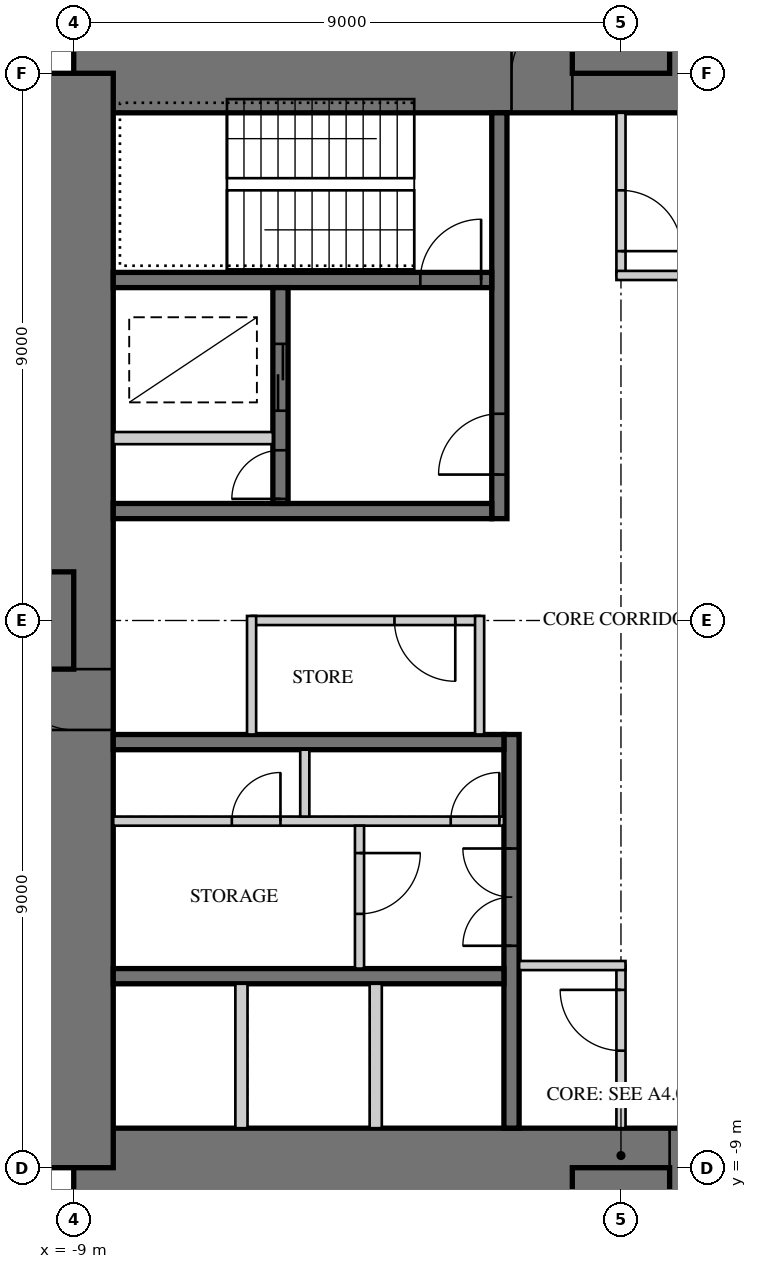
"""IFC4 building model, lengths in metres.
Left out: names, types, materials, properties, quantities, classifications, styles, units other than length and angle.
Written with IfcOpenShell. Run it as: python <this file> out.ifc"""

import sys

from ifc_helpers import new_model, si_unit, direction, frame, frame_2d, origin, place, context, subcontext, project, spatial, rectangle, extrude, element, fill, save


model = new_model("IFC4")
c1 = context("Model", 3, precision=1e-05, world=origin(), true_north=direction((0.0, 1.0)))
c2 = subcontext(c1, "Body", "Model", "MODEL_VIEW")
j1 = project(units=[si_unit("LENGTHUNIT", "METRE"), si_unit("PLANEANGLEUNIT", "RADIAN")], contexts=[c1])
p1 = place(None, origin())
s1 = spatial("IfcSite", under=j1, at=p1, CompositionType="ELEMENT")
p2 = place(p1, origin())
s2 = spatial("IfcBuilding", under=s1, at=p2, CompositionType="ELEMENT")
p3 = place(p2, frame((0.0, 0.0, 27.5)))
s3 = spatial("IfcBuildingStorey", under=s2, at=p3, CompositionType="ELEMENT", Elevation=27.5)
p4 = place(p3, frame((9.0, 9.0, 0.0), z_axis=(0.0, 0.0, 1.0), x_axis=(-1.0, 0.0, 0.0)))
e1 = element("IfcWall", 1, at=p4, inside=s3, PredefinedType="SHEAR", context=c2, shape_type="SweptSolid", body=[
    extrude(rectangle(XDim=18.0, YDim=1.3, at=frame_2d((9.0, 0.0))), origin(), (0.0, 0.0, 1.0), 4.0),
])
p5 = place(p4, frame((9.8, 0.0, 0.0)))
e2 = element("IfcOpeningElement", 2, at=p5, cuts=e1, PredefinedType="OPENING", context=c2, shape_type="SweptSolid", body=[
    extrude(rectangle(XDim=1.0, YDim=2.4, at=frame_2d((0.5, 1.2))), frame((0.0, 0.66, 0.0), z_axis=(0.0, -1.0, 0.0), x_axis=(1.0, 0.0, 0.0)), (0.0, 0.0, 1.0), 1.32),
])
p6 = place(p3, frame((-9.0, -9.0, 0.0), z_axis=(0.0, 0.0, 1.0), x_axis=(1.0, 0.0, 0.0)))
e3 = element("IfcWall", 3, at=p6, inside=s3, PredefinedType="SHEAR", context=c2, shape_type="SweptSolid", body=[
    extrude(rectangle(XDim=18.0, YDim=1.3, at=frame_2d((9.0, 0.0))), origin(), (0.0, 0.0, 1.0), 4.0),
])
p7 = place(p6, frame((9.8, 0.0, 0.0)))
e4 = element("IfcOpeningElement", 4, at=p7, cuts=e3, PredefinedType="OPENING", context=c2, shape_type="SweptSolid", body=[
    extrude(rectangle(XDim=1.0, YDim=2.4, at=frame_2d((0.5, 1.2))), frame((0.0, 0.66, 0.0), z_axis=(0.0, -1.0, 0.0), x_axis=(1.0, 0.0, 0.0)), (0.0, 0.0, 1.0), 1.32),
])
p8 = place(p3, frame((-9.0, 9.0, 0.0), z_axis=(0.0, 0.0, 1.0), x_axis=(0.0, -1.0, 0.0)))
e5 = element("IfcWall", 5, at=p8, inside=s3, PredefinedType="SHEAR", context=c2, shape_type="SweptSolid", body=[
    extrude(rectangle(XDim=18.0, YDim=1.3, at=frame_2d((9.0, 0.0))), origin(), (0.0, 0.0, 1.0), 4.0),
])
p9 = place(p8, frame((9.8, 0.0, 0.0)))
e6 = element("IfcOpeningElement", 6, at=p9, cuts=e5, PredefinedType="OPENING", context=c2, shape_type="SweptSolid", body=[
    extrude(rectangle(XDim=1.0, YDim=2.4, at=frame_2d((0.5, 1.2))), frame((0.0, 0.66, 0.0), z_axis=(0.0, -1.0, 0.0), x_axis=(1.0, 0.0, 0.0)), (0.0, 0.0, 1.0), 1.32),
])
p10 = place(p3, frame((-2.0, 1.675, 0.0), z_axis=(0.0, 0.0, 1.0), x_axis=(0.0, 1.0, 0.0)))
e7 = element("IfcWall", 7, at=p10, inside=s3, PredefinedType="SHEAR", context=c2, shape_type="SweptSolid", body=[
    extrude(rectangle(XDim=6.675, YDim=0.25, at=frame_2d((3.337, 0.0))), origin(), (0.0, 0.0, 1.0), 4.0),
])
p11 = place(p10, frame((0.725, 0.0, 0.0)))
e8 = element("IfcOpeningElement", 8, at=p11, cuts=e7, PredefinedType="OPENING", context=c2, shape_type="SweptSolid", body=[
    extrude(rectangle(XDim=1.0, YDim=2.1, at=frame_2d((0.5, 1.05))), frame((0.0, 0.135, 0.0), z_axis=(0.0, -1.0, 0.0), x_axis=(1.0, 0.0, 0.0)), (0.0, 0.0, 1.0), 0.27),
])
p12 = place(p3, frame((-2.125, 1.8, 0.0), z_axis=(0.0, 0.0, 1.0), x_axis=(-1.0, 0.0, 0.0)))
e9 = element("IfcWall", 9, at=p12, inside=s3, PredefinedType="SHEAR", context=c2, shape_type="SweptSolid", body=[
    extrude(rectangle(XDim=6.225, YDim=0.25, at=frame_2d((3.113, 0.0))), origin(), (0.0, 0.0, 1.0), 4.0),
])
p13 = place(p3, frame((-2.125, 5.6, 0.0), z_axis=(0.0, 0.0, 1.0), x_axis=(-1.0, 0.0, 0.0)))
e10 = element("IfcWall", 10, at=p13, inside=s3, PredefinedType="SHEAR", context=c2, shape_type="SweptSolid", body=[
    extrude(rectangle(XDim=6.225, YDim=0.25, at=frame_2d((3.113, 0.0))), origin(), (0.0, 0.0, 1.0), 4.0),
])
p14 = place(p13, frame((0.175, 0.0, 0.0)))
e11 = element("IfcOpeningElement", 11, at=p14, cuts=e10, PredefinedType="OPENING", context=c2, shape_type="SweptSolid", body=[
    extrude(rectangle(XDim=1.0, YDim=2.1, at=frame_2d((0.5, 1.05))), frame((0.0, 0.135, 0.0), z_axis=(0.0, -1.0, 0.0), x_axis=(1.0, 0.0, 0.0)), (0.0, 0.0, 1.0), 0.27),
])
p15 = place(p3, frame((-5.6, 1.925, 0.0), z_axis=(0.0, 0.0, 1.0), x_axis=(0.0, 1.0, 0.0)))
e12 = element("IfcWall", 12, at=p15, inside=s3, PredefinedType="SHEAR", context=c2, shape_type="SweptSolid", body=[
    extrude(rectangle(XDim=3.55, YDim=0.25, at=frame_2d((1.775, 0.0))), origin(), (0.0, 0.0, 1.0), 4.0),
])
p16 = place(p15, frame((1.525, 0.0, 0.0)))
e13 = element("IfcOpeningElement", 13, at=p16, cuts=e12, PredefinedType="OPENING", context=c2, shape_type="SweptSolid", body=[
    extrude(rectangle(XDim=1.1, YDim=2.2, at=frame_2d((0.55, 1.1))), frame((0.0, 0.135, 0.0), z_axis=(0.0, -1.0, 0.0), x_axis=(1.0, 0.0, 0.0)), (0.0, 0.0, 1.0), 0.27),
])
p17 = place(p15, frame((0.075, 0.0, 0.0)))
e14 = element("IfcOpeningElement", 14, at=p17, cuts=e12, PredefinedType="OPENING", context=c2, shape_type="SweptSolid", body=[
    extrude(rectangle(XDim=0.8, YDim=2.1, at=frame_2d((0.4, 1.05))), frame((0.0, 0.135, 0.0), z_axis=(0.0, -1.0, 0.0), x_axis=(1.0, 0.0, 0.0)), (0.0, 0.0, 1.0), 0.27),
])
p18 = place(p3, frame((-5.725, 3.0, 0.0), z_axis=(0.0, 0.0, 1.0), x_axis=(-1.0, 0.0, 0.0)))
e15 = element("IfcWall", 15, at=p18, inside=s3, PredefinedType="PARTITIONING", context=c2, shape_type="SweptSolid", body=[
    extrude(rectangle(XDim=2.625, YDim=0.2, at=frame_2d((1.312, 0.0))), origin(), (0.0, 0.0, 1.0), 4.0),
])
p19 = place(p3, frame((-1.8, -1.875, 0.0), z_axis=(0.0, 0.0, 1.0), x_axis=(0.0, -1.0, 0.0)))
e16 = element("IfcWall", 16, at=p19, inside=s3, PredefinedType="SHEAR", context=c2, shape_type="SweptSolid", body=[
    extrude(rectangle(XDim=6.475, YDim=0.25, at=frame_2d((3.238, 0.0))), origin(), (0.0, 0.0, 1.0), 4.0),
])
p20 = place(p19, frame((1.875, 0.0, 0.0)))
e17 = element("IfcOpeningElement", 17, at=p20, cuts=e16, PredefinedType="OPENING", context=c2, shape_type="SweptSolid", body=[
    extrude(rectangle(XDim=1.6, YDim=2.4, at=frame_2d((0.8, 1.2))), frame((0.0, 0.135, 0.0), z_axis=(0.0, -1.0, 0.0), x_axis=(1.0, 0.0, 0.0)), (0.0, 0.0, 1.0), 0.27),
])
for number, where, z_axis, x_axis in (
    (18, (-1.925, -2.0, 0.0), (0.0, 0.0, 1.0), (-1.0, 0.0, 0.0)),
    (19, (-1.925, -5.85, 0.0), (0.0, 0.0, 1.0), (-1.0, 0.0, 0.0)),
):
    element("IfcWall", number, at=place(p3, frame(where, z_axis=z_axis, x_axis=x_axis)), inside=s3, PredefinedType="SHEAR", context=c2, shape_type="SweptSolid", body=[
        extrude(rectangle(XDim=6.425, YDim=0.25, at=frame_2d((3.212, 0.0))), origin(), (0.0, 0.0, 1.0), 4.0),
    ])
p21 = place(p3, frame((-1.925, -3.3, 0.0), z_axis=(0.0, 0.0, 1.0), x_axis=(-1.0, 0.0, 0.0)))
e20 = element("IfcWall", 20, at=p21, inside=s3, PredefinedType="PARTITIONING", context=c2, shape_type="SweptSolid", body=[
    extrude(rectangle(XDim=6.425, YDim=0.15, at=frame_2d((3.212, 0.0))), origin(), (0.0, 0.0, 1.0), 4.0),
])
p22 = place(p21, frame((0.075, 0.0, 0.0)))
e21 = element("IfcOpeningElement", 21, at=p22, cuts=e20, PredefinedType="OPENING", context=c2, shape_type="SweptSolid", body=[
    extrude(rectangle(XDim=0.8, YDim=2.1, at=frame_2d((0.4, 1.05))), frame((0.0, 0.085, 0.0), z_axis=(0.0, -1.0, 0.0), x_axis=(1.0, 0.0, 0.0)), (0.0, 0.0, 1.0), 0.17),
])
p23 = place(p21, frame((3.675, 0.0, 0.0)))
e22 = element("IfcOpeningElement", 22, at=p23, cuts=e20, PredefinedType="OPENING", context=c2, shape_type="SweptSolid", body=[
    extrude(rectangle(XDim=0.8, YDim=2.1, at=frame_2d((0.4, 1.05))), frame((0.0, 0.085, 0.0), z_axis=(0.0, -1.0, 0.0), x_axis=(1.0, 0.0, 0.0)), (0.0, 0.0, 1.0), 0.17),
])
p24 = place(p3, frame((-5.2, -2.125, 0.0), z_axis=(0.0, 0.0, 1.0), x_axis=(0.0, -1.0, 0.0)))
e23 = element("IfcWall", 23, at=p24, inside=s3, PredefinedType="PARTITIONING", context=c2, shape_type="SweptSolid", body=[
    extrude(rectangle(XDim=1.1, YDim=0.15, at=frame_2d((0.55, 0.0))), origin(), (0.0, 0.0, 1.0), 4.0),
])
for number, where, z_axis, x_axis in (
    (24, (-4.033, -5.975, 0.0), (0.0, 0.0, 1.0), (0.0, -1.0, 0.0)),
    (25, (-6.242, -5.975, 0.0), (0.0, 0.0, 1.0), (0.0, -1.0, 0.0)),
):
    element("IfcWall", number, at=place(p3, frame(where, z_axis=z_axis, x_axis=x_axis)), inside=s3, PredefinedType="PARTITIONING", context=c2, shape_type="SweptSolid", body=[
        extrude(rectangle(XDim=2.375, YDim=0.2, at=frame_2d((1.188, 0.0))), origin(), (0.0, 0.0, 1.0), 4.0),
    ])
p25 = place(p3, frame((0.0, 9.0, 0.0), z_axis=(0.0, 0.0, 1.0), x_axis=(0.0, 1.0, 0.0)))
e26 = element("IfcWall", 26, at=p25, inside=s3, PredefinedType="SHEAR", context=c2, shape_type="SweptSolid", body=[
    extrude(rectangle(XDim=9.0, YDim=1.6, at=frame_2d((4.5, 0.0))), origin(), (0.0, 0.0, 1.0), 4.0),
])
p26 = place(p3, frame((0.0, -9.0, 0.0), z_axis=(0.0, 0.0, 1.0), x_axis=(0.0, -1.0, 0.0)))
e27 = element("IfcWall", 27, at=p26, inside=s3, PredefinedType="SHEAR", context=c2, shape_type="SweptSolid", body=[
    extrude(rectangle(XDim=18.0, YDim=1.6, at=frame_2d((9.0, 0.0))), origin(), (0.0, 0.0, 1.0), 4.0),
])
p27 = place(p26, frame((9.9, 0.0, 0.0)))
e28 = element("IfcOpeningElement", 28, at=p27, cuts=e27, PredefinedType="OPENING", context=c2, shape_type="SweptSolid", body=[
    extrude(rectangle(XDim=1.0, YDim=2.2, at=frame_2d((0.5, 1.1))), frame((0.0, 0.81, 0.0), z_axis=(0.0, -1.0, 0.0), x_axis=(1.0, 0.0, 0.0)), (0.0, 0.0, 1.0), 1.62),
])
p28 = place(p3, frame((-9.0, 0.0, 0.0), z_axis=(0.0, 0.0, 1.0), x_axis=(-1.0, 0.0, 0.0)))
e29 = element("IfcWall", 29, at=p28, inside=s3, PredefinedType="SHEAR", context=c2, shape_type="SweptSolid", body=[
    extrude(rectangle(XDim=18.0, YDim=1.6, at=frame_2d((9.0, 0.0))), origin(), (0.0, 0.0, 1.0), 4.0),
])
p29 = place(p28, frame((9.9, 0.0, 0.0)))
e30 = element("IfcOpeningElement", 30, at=p29, cuts=e29, PredefinedType="OPENING", context=c2, shape_type="SweptSolid", body=[
    extrude(rectangle(XDim=1.0, YDim=2.2, at=frame_2d((0.5, 1.1))), frame((0.0, 0.81, 0.0), z_axis=(0.0, -1.0, 0.0), x_axis=(1.0, 0.0, 0.0)), (0.0, 0.0, 1.0), 1.62),
])
p30 = place(p3, frame((-2.325, 0.0, 0.0), z_axis=(0.0, 0.0, 1.0), x_axis=(-1.0, 0.0, 0.0)))
e31 = element("IfcWall", 31, at=p30, inside=s3, PredefinedType="PARTITIONING", context=c2, shape_type="SweptSolid", body=[
    extrude(rectangle(XDim=3.75, YDim=0.15, at=frame_2d((1.875, 0.0))), origin(), (0.0, 0.0, 1.0), 3.8),
])
p31 = place(p30, frame((0.4, 0.0, 0.0)))
e32 = element("IfcOpeningElement", 32, at=p31, cuts=e31, PredefinedType="OPENING", context=c2, shape_type="SweptSolid", body=[
    extrude(rectangle(XDim=1.0, YDim=2.1, at=frame_2d((0.5, 1.05))), frame((0.0, 0.085, 0.0), z_axis=(0.0, -1.0, 0.0), x_axis=(1.0, 0.0, 0.0)), (0.0, 0.0, 1.0), 0.17),
])
for number, where, z_axis, x_axis in (
    (33, (-2.325, -1.875, 0.0), (0.0, 0.0, 1.0), (0.0, 1.0, 0.0)),
    (34, (-6.075, 0.075, 0.0), (0.0, 0.0, 1.0), (0.0, -1.0, 0.0)),
):
    element("IfcWall", number, at=place(p3, frame(where, z_axis=z_axis, x_axis=x_axis)), inside=s3, PredefinedType="PARTITIONING", context=c2, shape_type="SweptSolid", body=[
        extrude(rectangle(XDim=1.95, YDim=0.15, at=frame_2d((0.975, 0.0))), origin(), (0.0, 0.0, 1.0), 3.8),
    ])
p32 = place(p3, frame((0.0, 5.675, 0.0), z_axis=(0.0, 0.0, 1.0), x_axis=(0.0, 1.0, 0.0)))
e35 = element("IfcWall", 35, at=p32, inside=s3, PredefinedType="PARTITIONING", context=c2, shape_type="SweptSolid", body=[
    extrude(rectangle(XDim=2.675, YDim=0.15, at=frame_2d((1.337, 0.0))), origin(), (0.0, 0.0, 1.0), 3.8),
])
p33 = place(p32, frame((0.4, 0.0, 0.0)))
e36 = element("IfcOpeningElement", 36, at=p33, cuts=e35, PredefinedType="OPENING", context=c2, shape_type="SweptSolid", body=[
    extrude(rectangle(XDim=1.0, YDim=2.1, at=frame_2d((0.5, 1.05))), frame((0.0, 0.085, 0.0), z_axis=(0.0, -1.0, 0.0), x_axis=(1.0, 0.0, 0.0)), (0.0, 0.0, 1.0), 0.17),
])
p34 = place(p3, frame((1.675, 5.675, 0.0), z_axis=(0.0, 0.0, 1.0), x_axis=(-1.0, 0.0, 0.0)))
e37 = element("IfcWall", 37, at=p34, inside=s3, PredefinedType="PARTITIONING", context=c2, shape_type="SweptSolid", body=[
    extrude(rectangle(XDim=1.75, YDim=0.15, at=frame_2d((0.875, 0.0))), origin(), (0.0, 0.0, 1.0), 3.8),
])
p35 = place(p3, frame((0.0, -5.675, 0.0), z_axis=(0.0, 0.0, 1.0), x_axis=(0.0, -1.0, 0.0)))
e38 = element("IfcWall", 38, at=p35, inside=s3, PredefinedType="PARTITIONING", context=c2, shape_type="SweptSolid", body=[
    extrude(rectangle(XDim=2.675, YDim=0.15, at=frame_2d((1.337, 0.0))), origin(), (0.0, 0.0, 1.0), 3.8),
])
p36 = place(p35, frame((0.4, 0.0, 0.0)))
e39 = element("IfcOpeningElement", 39, at=p36, cuts=e38, PredefinedType="OPENING", context=c2, shape_type="SweptSolid", body=[
    extrude(rectangle(XDim=1.0, YDim=2.1, at=frame_2d((0.5, 1.05))), frame((0.0, 0.085, 0.0), z_axis=(0.0, -1.0, 0.0), x_axis=(1.0, 0.0, 0.0)), (0.0, 0.0, 1.0), 0.17),
])
p37 = place(p3, frame((-1.675, -5.675, 0.0), z_axis=(0.0, 0.0, 1.0), x_axis=(1.0, 0.0, 0.0)))
e40 = element("IfcWall", 40, at=p37, inside=s3, PredefinedType="PARTITIONING", context=c2, shape_type="SweptSolid", body=[
    extrude(rectangle(XDim=1.75, YDim=0.15, at=frame_2d((0.875, 0.0))), origin(), (0.0, 0.0, 1.0), 3.8),
])
p38 = place(p3, frame((-4.3, -3.375, 0.0), z_axis=(0.0, 0.0, 1.0), x_axis=(0.0, -1.0, 0.0)))
e41 = element("IfcWall", 41, at=p38, inside=s3, PredefinedType="PARTITIONING", context=c2, shape_type="SweptSolid", body=[
    extrude(rectangle(XDim=2.35, YDim=0.15, at=frame_2d((1.175, 0.0))), origin(), (0.0, 0.0, 1.0), 3.8),
])
p39 = place(p38, frame((0.45, 0.0, 0.0)))
e42 = element("IfcOpeningElement", 42, at=p39, cuts=e41, PredefinedType="OPENING", context=c2, shape_type="SweptSolid", body=[
    extrude(rectangle(XDim=1.0, YDim=2.1, at=frame_2d((0.5, 1.05))), frame((0.0, 0.085, 0.0), z_axis=(0.0, -1.0, 0.0), x_axis=(1.0, 0.0, 0.0)), (0.0, 0.0, 1.0), 0.17),
])
p40 = place(p31, origin())
e43 = element("IfcDoor", 43, at=p40, inside=s3, OperationType="SINGLE_SWING_LEFT", PredefinedType="DOOR", context=c2, shape_type="SweptSolid", body=[
    extrude(rectangle(XDim=1.0, YDim=2.1, at=frame_2d((0.5, 1.05))), frame((0.0, 0.025, 0.0), z_axis=(0.0, -1.0, 0.0), x_axis=(1.0, 0.0, 0.0)), (0.0, 0.0, 1.0), 0.05),
])
fill(e32, e43)
p41 = place(p33, frame((1.0, 0.0, 0.0), z_axis=(0.0, 0.0, 1.0), x_axis=(-1.0, 0.0, 0.0)))
e44 = element("IfcDoor", 44, at=p41, inside=s3, OperationType="SINGLE_SWING_RIGHT", PredefinedType="DOOR", context=c2, shape_type="SweptSolid", body=[
    extrude(rectangle(XDim=1.0, YDim=2.1, at=frame_2d((0.5, 1.05))), frame((0.0, 0.025, 0.0), z_axis=(0.0, -1.0, 0.0), x_axis=(1.0, 0.0, 0.0)), (0.0, 0.0, 1.0), 0.05),
])
fill(e36, e44)
p42 = place(p36, frame((1.0, 0.0, 0.0), z_axis=(0.0, 0.0, 1.0), x_axis=(-1.0, 0.0, 0.0)))
e45 = element("IfcDoor", 45, at=p42, inside=s3, OperationType="SINGLE_SWING_RIGHT", PredefinedType="DOOR", context=c2, shape_type="SweptSolid", body=[
    extrude(rectangle(XDim=1.0, YDim=2.1, at=frame_2d((0.5, 1.05))), frame((0.0, 0.025, 0.0), z_axis=(0.0, -1.0, 0.0), x_axis=(1.0, 0.0, 0.0)), (0.0, 0.0, 1.0), 0.05),
])
fill(e39, e45)
p43 = place(p39, origin())
e46 = element("IfcDoor", 46, at=p43, inside=s3, OperationType="SINGLE_SWING_LEFT", PredefinedType="DOOR", context=c2, shape_type="SweptSolid", body=[
    extrude(rectangle(XDim=1.0, YDim=2.1, at=frame_2d((0.5, 1.05))), frame((0.0, 0.025, 0.0), z_axis=(0.0, -1.0, 0.0), x_axis=(1.0, 0.0, 0.0)), (0.0, 0.0, 1.0), 0.05),
])
fill(e42, e46)
p44 = place(p5, frame((1.0, 0.0, 0.0), z_axis=(0.0, 0.0, 1.0), x_axis=(-1.0, 0.0, 0.0)))
e47 = element("IfcDoor", 47, at=p44, inside=s3, OperationType="SINGLE_SWING_RIGHT", PredefinedType="DOOR", context=c2, shape_type="SweptSolid", body=[
    extrude(rectangle(XDim=1.0, YDim=2.4, at=frame_2d((0.5, 1.2))), frame((0.0, -0.005, 0.0), z_axis=(0.0, -1.0, 0.0), x_axis=(1.0, 0.0, 0.0)), (0.0, 0.0, 1.0), 0.05),
])
fill(e2, e47)
p45 = place(p7, frame((1.0, 0.0, 0.0), z_axis=(0.0, 0.0, 1.0), x_axis=(-1.0, 0.0, 0.0)))
e48 = element("IfcDoor", 48, at=p45, inside=s3, OperationType="SINGLE_SWING_RIGHT", PredefinedType="DOOR", context=c2, shape_type="SweptSolid", body=[
    extrude(rectangle(XDim=1.0, YDim=2.4, at=frame_2d((0.5, 1.2))), frame((0.0, -0.005, 0.0), z_axis=(0.0, -1.0, 0.0), x_axis=(1.0, 0.0, 0.0)), (0.0, 0.0, 1.0), 0.05),
])
fill(e4, e48)
p46 = place(p9, frame((1.0, 0.0, 0.0), z_axis=(0.0, 0.0, 1.0), x_axis=(-1.0, 0.0, 0.0)))
e49 = element("IfcDoor", 49, at=p46, inside=s3, OperationType="SINGLE_SWING_RIGHT", PredefinedType="DOOR", context=c2, shape_type="SweptSolid", body=[
    extrude(rectangle(XDim=1.0, YDim=2.4, at=frame_2d((0.5, 1.2))), frame((0.0, -0.005, 0.0), z_axis=(0.0, -1.0, 0.0), x_axis=(1.0, 0.0, 0.0)), (0.0, 0.0, 1.0), 0.05),
])
fill(e6, e49)
p47 = place(p11, origin())
e50 = element("IfcDoor", 50, at=p47, inside=s3, OperationType="SINGLE_SWING_LEFT", PredefinedType="DOOR", context=c2, shape_type="SweptSolid", body=[
    extrude(rectangle(XDim=1.0, YDim=2.1, at=frame_2d((0.5, 1.05))), frame((0.0, 0.025, 0.0), z_axis=(0.0, -1.0, 0.0), x_axis=(1.0, 0.0, 0.0)), (0.0, 0.0, 1.0), 0.05),
])
fill(e8, e50)
p48 = place(p14, frame((1.0, 0.0, 0.0), z_axis=(0.0, 0.0, 1.0), x_axis=(-1.0, 0.0, 0.0)))
e51 = element("IfcDoor", 51, at=p48, inside=s3, OperationType="SINGLE_SWING_RIGHT", PredefinedType="DOOR", context=c2, shape_type="SweptSolid", body=[
    extrude(rectangle(XDim=1.0, YDim=2.1, at=frame_2d((0.5, 1.05))), frame((0.0, 0.025, 0.0), z_axis=(0.0, -1.0, 0.0), x_axis=(1.0, 0.0, 0.0)), (0.0, 0.0, 1.0), 0.05),
])
fill(e11, e51)
p49 = place(p16, origin())
e52 = element("IfcDoor", 52, at=p49, inside=s3, OperationType="DOUBLE_DOOR_SLIDING", PredefinedType="DOOR", context=c2, shape_type="SweptSolid", body=[
    extrude(rectangle(XDim=1.1, YDim=2.2, at=frame_2d((0.55, 1.1))), frame((0.0, 0.025, 0.0), z_axis=(0.0, -1.0, 0.0), x_axis=(1.0, 0.0, 0.0)), (0.0, 0.0, 1.0), 0.05),
])
fill(e13, e52)
p50 = place(p17, origin())
e53 = element("IfcDoor", 53, at=p50, inside=s3, OperationType="SINGLE_SWING_LEFT", PredefinedType="DOOR", context=c2, shape_type="SweptSolid", body=[
    extrude(rectangle(XDim=0.8, YDim=2.1, at=frame_2d((0.4, 1.05))), frame((0.0, 0.025, 0.0), z_axis=(0.0, -1.0, 0.0), x_axis=(1.0, 0.0, 0.0)), (0.0, 0.0, 1.0), 0.05),
])
fill(e14, e53)
p51 = place(p20, frame((1.6, 0.0, 0.0), z_axis=(0.0, 0.0, 1.0), x_axis=(-1.0, 0.0, 0.0)))
e54 = element("IfcDoor", 54, at=p51, inside=s3, OperationType="DOUBLE_DOOR_SINGLE_SWING", PredefinedType="DOOR", context=c2, shape_type="SweptSolid", body=[
    extrude(rectangle(XDim=1.6, YDim=2.4, at=frame_2d((0.8, 1.2))), frame((0.0, 0.025, 0.0), z_axis=(0.0, -1.0, 0.0), x_axis=(1.0, 0.0, 0.0)), (0.0, 0.0, 1.0), 0.05),
])
fill(e17, e54)
p52 = place(p22, frame((0.8, 0.0, 0.0), z_axis=(0.0, 0.0, 1.0), x_axis=(-1.0, 0.0, 0.0)))
e55 = element("IfcDoor", 55, at=p52, inside=s3, OperationType="SINGLE_SWING_RIGHT", PredefinedType="DOOR", context=c2, shape_type="SweptSolid", body=[
    extrude(rectangle(XDim=0.8, YDim=2.1, at=frame_2d((0.4, 1.05))), frame((0.0, 0.025, 0.0), z_axis=(0.0, -1.0, 0.0), x_axis=(1.0, 0.0, 0.0)), (0.0, 0.0, 1.0), 0.05),
])
fill(e21, e55)
p53 = place(p23, frame((0.8, 0.0, 0.0), z_axis=(0.0, 0.0, 1.0), x_axis=(-1.0, 0.0, 0.0)))
e56 = element("IfcDoor", 56, at=p53, inside=s3, OperationType="SINGLE_SWING_RIGHT", PredefinedType="DOOR", context=c2, shape_type="SweptSolid", body=[
    extrude(rectangle(XDim=0.8, YDim=2.1, at=frame_2d((0.4, 1.05))), frame((0.0, 0.025, 0.0), z_axis=(0.0, -1.0, 0.0), x_axis=(1.0, 0.0, 0.0)), (0.0, 0.0, 1.0), 0.05),
])
fill(e22, e56)
save(model, sys.argv[1])
